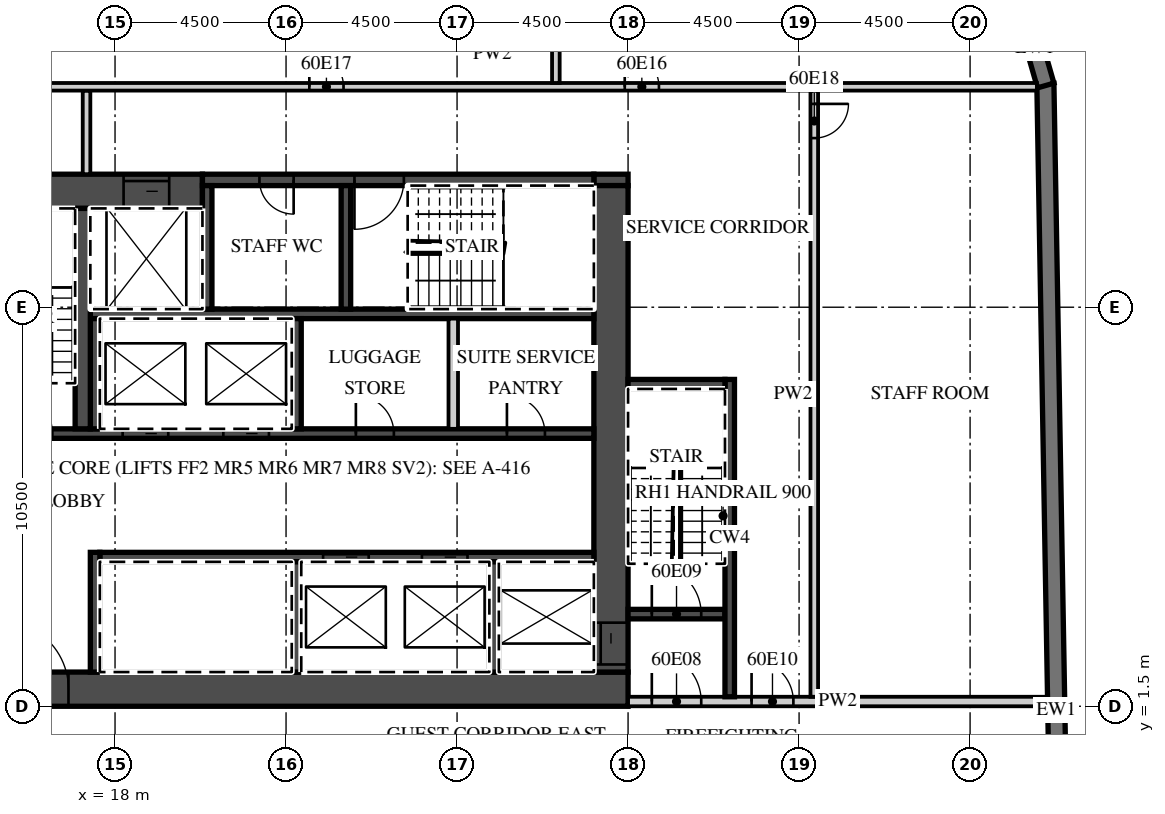
"""IFC4 building model, lengths in metres.
Left out: names, types, materials, properties, quantities, classifications, styles, units other than length and angle.
Written with IfcOpenShell. Run it as: python <this file> out.ifc"""

import sys

from ifc_helpers import new_model, si_unit, direction, frame, frame_2d, origin, place, context, subcontext, project, spatial, polyline, rectangle, outline, extrude, element, fill, save


model = new_model("IFC4")
c1 = context("Model", 3, precision=1e-05, world=origin(), true_north=direction((0.0, 1.0)))
c2 = subcontext(c1, "Body", "Model", "MODEL_VIEW")
j1 = project(units=[si_unit("LENGTHUNIT", "METRE"), si_unit("PLANEANGLEUNIT", "RADIAN")], contexts=[c1])
p1 = place(None, origin())
s1 = spatial("IfcSite", under=j1, at=p1, CompositionType="ELEMENT")
p2 = place(p1, origin())
s2 = spatial("IfcBuilding", under=s1, at=p2, CompositionType="ELEMENT")
p3 = place(p2, frame((0.0, 0.0, 244.1)))
s3 = spatial("IfcBuildingStorey", under=s2, at=p3, CompositionType="ELEMENT", Elevation=244.1)
p4 = place(p3, frame((43.057, -15.103, 0.0), z_axis=(0.0, 0.0, 1.0), x_axis=(-0.017452408953, 0.999847695112, 0.0)))
e1 = element("IfcWall", 1, at=p4, inside=s3, PredefinedType="SOLIDWALL", context=c2, shape_type="SweptSolid", body=[
    extrude(rectangle(XDim=33.0, YDim=0.45, at=frame_2d((16.5, 0.0))), origin(), (0.0, 0.0, 1.0), 3.02),
])
p5 = place(p3, frame((42.49, 17.833, 0.0), z_axis=(0.0, 0.0, 1.0), x_axis=(-0.275546368831, 0.961287781377, 0.0)))
e2 = element("IfcWall", 2, at=p5, inside=s3, PredefinedType="SOLIDWALL", context=c2, shape_type="SweptSolid", body=[
    extrude(outline(polyline([(0.0, -0.225), (2.071, -0.225), (1.95, 0.225), (0.121, 0.225), (0.0, -0.225)])), origin(), (0.0, 0.0, 1.0), 3.02),
])
p6 = place(p3, frame((13.5, 1.95, 0.0), z_axis=(0.0, 0.0, 1.0), x_axis=(1.0, 0.0, 0.0)))
e3 = element("IfcWall", 3, at=p6, inside=s3, PredefinedType="SHEAR", context=c2, shape_type="SweptSolid", body=[
    extrude(rectangle(XDim=18.0, YDim=0.9, at=frame_2d((9.0, 0.0))), origin(), (0.0, 0.0, 1.0), 3.02),
])
p7 = place(p6, frame((1.475, 0.0, 0.0)))
e4 = element("IfcOpeningElement", 4, at=p7, cuts=e3, PredefinedType="OPENING", context=c2, shape_type="SweptSolid", body=[
    extrude(rectangle(XDim=1.8, YDim=2.1, at=frame_2d((0.9, 1.05))), frame((0.0, 0.46, 0.0), z_axis=(0.0, -1.0, 0.0), x_axis=(1.0, 0.0, 0.0)), (0.0, 0.0, 1.0), 0.92),
])
p8 = place(p3, frame((13.5, 15.05, 0.0), z_axis=(0.0, 0.0, 1.0), x_axis=(1.0, 0.0, 0.0)))
e5 = element("IfcWall", 5, at=p8, inside=s3, PredefinedType="SHEAR", context=c2, shape_type="SweptSolid", body=[
    extrude(rectangle(XDim=6.8, YDim=0.9, at=frame_2d((3.4, 0.0))), origin(), (0.0, 0.0, 1.0), 3.02),
])
p9 = place(p8, frame((4.725, 0.0, 0.0)))
e6 = element("IfcOpeningElement", 6, at=p9, cuts=e5, PredefinedType="OPENING", context=c2, shape_type="SweptSolid", body=[
    extrude(rectangle(XDim=1.2, YDim=2.1, at=frame_2d((0.6, 1.05))), frame((0.0, 0.46, 0.0), z_axis=(0.0, -1.0, 0.0), x_axis=(1.0, 0.0, 0.0)), (0.0, 0.0, 1.0), 0.92),
])
p10 = place(p3, frame((30.6, 15.35, 0.0), z_axis=(0.0, 0.0, 1.0), x_axis=(1.0, 0.0, 0.0)))
e7 = element("IfcWall", 7, at=p10, inside=s3, PredefinedType="SHEAR", context=c2, shape_type="SweptSolid", body=[
    extrude(rectangle(XDim=0.9, YDim=0.3, at=frame_2d((0.45, 0.0))), origin(), (0.0, 0.0, 1.0), 3.02),
])
p11 = place(p3, frame((20.3, 15.35, 0.0), z_axis=(0.0, 0.0, 1.0), x_axis=(1.0, 0.0, 0.0)))
e8 = element("IfcWall", 8, at=p11, inside=s3, PredefinedType="SHEAR", context=c2, shape_type="SweptSolid", body=[
    extrude(rectangle(XDim=10.3, YDim=0.3, at=frame_2d((5.15, 0.0))), origin(), (0.0, 0.0, 1.0), 3.02),
])
p12 = place(p11, frame((4.0, 0.0, 0.0)))
e9 = element("IfcOpeningElement", 9, at=p12, cuts=e8, PredefinedType="OPENING", context=c2, shape_type="SweptSolid", body=[
    extrude(rectangle(XDim=1.3, YDim=2.1, at=frame_2d((0.65, 1.05))), frame((0.0, 0.16, 0.0), z_axis=(0.0, -1.0, 0.0), x_axis=(1.0, 0.0, 0.0)), (0.0, 0.0, 1.0), 0.32),
])
p13 = place(p11, frame((1.5, 0.0, 0.0)))
e10 = element("IfcOpeningElement", 10, at=p13, cuts=e8, PredefinedType="OPENING", context=c2, shape_type="SweptSolid", body=[
    extrude(rectangle(XDim=0.9, YDim=2.1, at=frame_2d((0.45, 1.05))), frame((0.0, 0.16, 0.0), z_axis=(0.0, -1.0, 0.0), x_axis=(1.0, 0.0, 0.0)), (0.0, 0.0, 1.0), 0.32),
])
p14 = place(p3, frame((31.05, 2.4, 0.0), z_axis=(0.0, 0.0, 1.0), x_axis=(0.0, 1.0, 0.0)))
e11 = element("IfcWall", 11, at=p14, inside=s3, PredefinedType="SHEAR", context=c2, shape_type="SweptSolid", body=[
    extrude(rectangle(XDim=12.8, YDim=0.9, at=frame_2d((6.4, 0.0))), origin(), (0.0, 0.0, 1.0), 3.02),
])
p15 = place(p14, frame((0.2, 0.0, 0.0)))
e12 = element("IfcOpeningElement", 12, at=p15, cuts=e11, PredefinedType="OPENING", context=c2, shape_type="SweptSolid", body=[
    extrude(rectangle(XDim=1.1, YDim=2.1, at=frame_2d((0.55, 1.05))), frame((0.0, 0.46, 0.0), z_axis=(0.0, -1.0, 0.0), x_axis=(1.0, 0.0, 0.0)), (0.0, 0.0, 1.0), 0.92),
])
p16 = place(p3, frame((17.6, 5.425, 0.0), z_axis=(0.0, 0.0, 1.0), x_axis=(1.0, 0.0, 0.0)))
e13 = element("IfcWall", 13, at=p16, inside=s3, PredefinedType="SHEAR", context=c2, shape_type="SweptSolid", body=[
    extrude(rectangle(XDim=13.0, YDim=0.25, at=frame_2d((6.5, 0.0))), origin(), (0.0, 0.0, 1.0), 3.02),
])
p17 = place(p16, frame((8.475, 0.0, 0.0)))
e14 = element("IfcOpeningElement", 14, at=p17, cuts=e13, PredefinedType="OPENING", context=c2, shape_type="SweptSolid", body=[
    extrude(rectangle(XDim=1.2, YDim=2.1, at=frame_2d((0.6, 1.05))), frame((0.0, 0.135, 0.0), z_axis=(0.0, -1.0, 0.0), x_axis=(1.0, 0.0, 0.0)), (0.0, 0.0, 1.0), 0.27),
])
p18 = place(p16, frame((5.875, 0.0, 0.0)))
e15 = element("IfcOpeningElement", 15, at=p18, cuts=e13, PredefinedType="OPENING", context=c2, shape_type="SweptSolid", body=[
    extrude(rectangle(XDim=1.2, YDim=2.1, at=frame_2d((0.6, 1.05))), frame((0.0, 0.135, 0.0), z_axis=(0.0, -1.0, 0.0), x_axis=(1.0, 0.0, 0.0)), (0.0, 0.0, 1.0), 0.27),
])
p19 = place(p3, frame((17.475, 2.4, 0.0), z_axis=(0.0, 0.0, 1.0), x_axis=(0.0, 1.0, 0.0)))
e16 = element("IfcWall", 16, at=p19, inside=s3, PredefinedType="SHEAR", context=c2, shape_type="SweptSolid", body=[
    extrude(rectangle(XDim=3.15, YDim=0.25, at=frame_2d((1.575, 0.0))), origin(), (0.0, 0.0, 1.0), 3.02),
])
for number, where, z_axis, x_axis in (
    (17, (27.975, 2.4, 0.0), (0.0, 0.0, 1.0), (0.0, 1.0, 0.0)),
    (18, (22.775, 2.4, 0.0), (0.0, 0.0, 1.0), (0.0, 1.0, 0.0)),
):
    element("IfcWall", number, at=place(p3, frame(where, z_axis=z_axis, x_axis=x_axis)), inside=s3, PredefinedType="SHEAR", context=c2, shape_type="SweptSolid", body=[
        extrude(rectangle(XDim=2.9, YDim=0.25, at=frame_2d((1.45, 0.0))), origin(), (0.0, 0.0, 1.0), 3.02),
    ])
p20 = place(p3, frame((14.4, 8.675, 0.0), z_axis=(0.0, 0.0, 1.0), x_axis=(1.0, 0.0, 0.0)))
e19 = element("IfcWall", 19, at=p20, inside=s3, PredefinedType="SHEAR", context=c2, shape_type="SweptSolid", body=[
    extrude(rectangle(XDim=16.2, YDim=0.25, at=frame_2d((8.1, 0.0))), origin(), (0.0, 0.0, 1.0), 3.02),
])
p21 = place(p20, frame((6.45, 0.0, 0.0)))
e20 = element("IfcOpeningElement", 20, at=p21, cuts=e19, PredefinedType="OPENING", context=c2, shape_type="SweptSolid", body=[
    extrude(rectangle(XDim=1.2, YDim=2.1, at=frame_2d((0.6, 1.05))), frame((0.0, 0.135, 0.0), z_axis=(0.0, -1.0, 0.0), x_axis=(1.0, 0.0, 0.0)), (0.0, 0.0, 1.0), 0.27),
])
p22 = place(p20, frame((3.8, 0.0, 0.0)))
e21 = element("IfcOpeningElement", 21, at=p22, cuts=e19, PredefinedType="OPENING", context=c2, shape_type="SweptSolid", body=[
    extrude(rectangle(XDim=1.2, YDim=2.1, at=frame_2d((0.6, 1.05))), frame((0.0, 0.135, 0.0), z_axis=(0.0, -1.0, 0.0), x_axis=(1.0, 0.0, 0.0)), (0.0, 0.0, 1.0), 0.27),
])
p23 = place(p20, frame((0.65, 0.0, 0.0)))
e22 = element("IfcOpeningElement", 22, at=p23, cuts=e19, PredefinedType="OPENING", context=c2, shape_type="SweptSolid", body=[
    extrude(rectangle(XDim=1.3, YDim=2.1, at=frame_2d((0.65, 1.05))), frame((0.0, 0.135, 0.0), z_axis=(0.0, -1.0, 0.0), x_axis=(1.0, 0.0, 0.0)), (0.0, 0.0, 1.0), 0.27),
])
p24 = place(p20, frame((13.913, 0.0, 0.0)))
e23 = element("IfcOpeningElement", 23, at=p24, cuts=e19, PredefinedType="OPENING", context=c2, shape_type="SweptSolid", body=[
    extrude(rectangle(XDim=1.0, YDim=2.1, at=frame_2d((0.5, 1.05))), frame((0.0, 0.135, 0.0), z_axis=(0.0, -1.0, 0.0), x_axis=(1.0, 0.0, 0.0)), (0.0, 0.0, 1.0), 0.27),
])
p25 = place(p20, frame((9.938, 0.0, 0.0)))
e24 = element("IfcOpeningElement", 24, at=p25, cuts=e19, PredefinedType="OPENING", context=c2, shape_type="SweptSolid", body=[
    extrude(rectangle(XDim=1.0, YDim=2.1, at=frame_2d((0.5, 1.05))), frame((0.0, 0.135, 0.0), z_axis=(0.0, -1.0, 0.0), x_axis=(1.0, 0.0, 0.0)), (0.0, 0.0, 1.0), 0.27),
])
p26 = place(p3, frame((17.35, 11.825, 0.0), z_axis=(0.0, 0.0, 1.0), x_axis=(1.0, 0.0, 0.0)))
e25 = element("IfcWall", 25, at=p26, inside=s3, PredefinedType="SHEAR", context=c2, shape_type="SweptSolid", body=[
    extrude(rectangle(XDim=13.25, YDim=0.25, at=frame_2d((6.625, 0.0))), origin(), (0.0, 0.0, 1.0), 3.02),
])
for number, where, z_axis, x_axis in (
    (26, (17.475, 8.8, 0.0), (0.0, 0.0, 1.0), (0.0, 1.0, 0.0)),
    (27, (22.775, 8.8, 0.0), (0.0, 0.0, 1.0), (0.0, 1.0, 0.0)),
):
    element("IfcWall", number, at=place(p3, frame(where, z_axis=z_axis, x_axis=x_axis)), inside=s3, PredefinedType="SHEAR", context=c2, shape_type="SweptSolid", body=[
        extrude(rectangle(XDim=2.9, YDim=0.25, at=frame_2d((1.45, 0.0))), origin(), (0.0, 0.0, 1.0), 3.02),
    ])
p27 = place(p3, frame((26.9, 8.8, 0.0), z_axis=(0.0, 0.0, 1.0), x_axis=(0.0, 1.0, 0.0)))
e28 = element("IfcWall", 28, at=p27, inside=s3, PredefinedType="PARTITIONING", context=c2, shape_type="SweptSolid", body=[
    extrude(rectangle(XDim=2.9, YDim=0.25, at=frame_2d((1.45, 0.0))), origin(), (0.0, 0.0, 1.0), 3.02),
])
p28 = place(p3, frame((17.15, 8.8, 0.0), z_axis=(0.0, 0.0, 1.0), x_axis=(0.0, 1.0, 0.0)))
e29 = element("IfcWall", 29, at=p28, inside=s3, PredefinedType="SHEAR", context=c2, shape_type="SweptSolid", body=[
    extrude(rectangle(XDim=5.8, YDim=0.4, at=frame_2d((2.9, 0.0))), origin(), (0.0, 0.0, 1.0), 3.02),
])
for number, where, z_axis, x_axis in (
    (30, (20.425, 11.95, 0.0), (0.0, 0.0, 1.0), (0.0, 1.0, 0.0)),
    (31, (24.075, 11.95, 0.0), (0.0, 0.0, 1.0), (0.0, 1.0, 0.0)),
):
    element("IfcWall", number, at=place(p3, frame(where, z_axis=z_axis, x_axis=x_axis)), inside=s3, PredefinedType="SHEAR", context=c2, shape_type="SweptSolid", body=[
        extrude(rectangle(XDim=3.25, YDim=0.25, at=frame_2d((1.625, 0.0))), origin(), (0.0, 0.0, 1.0), 3.02),
    ])
p29 = place(p3, frame((31.5, 1.625, 0.0), z_axis=(0.0, 0.0, 1.0), x_axis=(1.0, 0.0, 0.0)))
e32 = element("IfcWall", 32, at=p29, inside=s3, PredefinedType="PARTITIONING", context=c2, shape_type="SweptSolid", body=[
    extrude(rectangle(XDim=11.04, YDim=0.25, at=frame_2d((5.52, 0.0))), origin(), (0.0, 0.0, 1.0), 3.02),
])
p30 = place(p29, frame((0.625, 0.0, 0.0)))
e33 = element("IfcOpeningElement", 33, at=p30, cuts=e32, PredefinedType="OPENING", context=c2, shape_type="SweptSolid", body=[
    extrude(rectangle(XDim=1.3, YDim=2.1, at=frame_2d((0.65, 1.05))), frame((0.0, 0.135, 0.0), z_axis=(0.0, -1.0, 0.0), x_axis=(1.0, 0.0, 0.0)), (0.0, 0.0, 1.0), 0.27),
])
p31 = place(p29, frame((3.25, 0.0, 0.0)))
e34 = element("IfcOpeningElement", 34, at=p31, cuts=e32, PredefinedType="OPENING", context=c2, shape_type="SweptSolid", body=[
    extrude(rectangle(XDim=1.1, YDim=2.1, at=frame_2d((0.55, 1.05))), frame((0.0, 0.135, 0.0), z_axis=(0.0, -1.0, 0.0), x_axis=(1.0, 0.0, 0.0)), (0.0, 0.0, 1.0), 0.27),
])
p32 = place(p3, frame((31.5, 3.925, 0.0), z_axis=(0.0, 0.0, 1.0), x_axis=(1.0, 0.0, 0.0)))
e35 = element("IfcWall", 35, at=p32, inside=s3, PredefinedType="SHEAR", context=c2, shape_type="SweptSolid", body=[
    extrude(rectangle(XDim=2.55, YDim=0.25, at=frame_2d((1.275, 0.0))), origin(), (0.0, 0.0, 1.0), 3.02),
])
p33 = place(p32, frame((0.625, 0.0, 0.0)))
e36 = element("IfcOpeningElement", 36, at=p33, cuts=e35, PredefinedType="OPENING", context=c2, shape_type="SweptSolid", body=[
    extrude(rectangle(XDim=1.3, YDim=2.1, at=frame_2d((0.65, 1.05))), frame((0.0, 0.135, 0.0), z_axis=(0.0, -1.0, 0.0), x_axis=(1.0, 0.0, 0.0)), (0.0, 0.0, 1.0), 0.27),
])
p34 = place(p3, frame((34.175, 1.75, 0.0), z_axis=(0.0, 0.0, 1.0), x_axis=(0.0, 1.0, 0.0)))
e37 = element("IfcWall", 37, at=p34, inside=s3, PredefinedType="SHEAR", context=c2, shape_type="SweptSolid", body=[
    extrude(rectangle(XDim=8.35, YDim=0.25, at=frame_2d((4.175, 0.0))), origin(), (0.0, 0.0, 1.0), 3.02),
])
p35 = place(p3, frame((31.5, 9.975, 0.0), z_axis=(0.0, 0.0, 1.0), x_axis=(1.0, 0.0, 0.0)))
e38 = element("IfcWall", 38, at=p35, inside=s3, PredefinedType="SHEAR", context=c2, shape_type="SweptSolid", body=[
    extrude(rectangle(XDim=2.55, YDim=0.25, at=frame_2d((1.275, 0.0))), origin(), (0.0, 0.0, 1.0), 3.02),
])
p36 = place(p3, frame((17.25, 15.5, 0.0), z_axis=(0.0, 0.0, 1.0), x_axis=(0.0, 1.0, 0.0)))
e39 = element("IfcWall", 39, at=p36, inside=s3, PredefinedType="PARTITIONING", context=c2, shape_type="SweptSolid", body=[
    extrude(rectangle(XDim=2.2, YDim=0.2, at=frame_2d((1.1, 0.0))), origin(), (0.0, 0.0, 1.0), 3.02),
])
p37 = place(p3, frame((36.4, 1.75, 0.0), z_axis=(0.0, 0.0, 1.0), x_axis=(0.0, 1.0, 0.0)))
e40 = element("IfcWall", 40, at=p37, inside=s3, PredefinedType="PARTITIONING", context=c2, shape_type="SweptSolid", body=[
    extrude(rectangle(XDim=15.95, YDim=0.2, at=frame_2d((7.975, 0.0))), origin(), (0.0, 0.0, 1.0), 3.02),
])
p38 = place(p37, frame((14.7, 0.0, 0.0)))
e41 = element("IfcOpeningElement", 41, at=p38, cuts=e40, PredefinedType="OPENING", context=c2, shape_type="SweptSolid", body=[
    extrude(rectangle(XDim=0.9, YDim=2.1, at=frame_2d((0.45, 1.05))), frame((0.0, 0.11, 0.0), z_axis=(0.0, -1.0, 0.0), x_axis=(1.0, 0.0, 0.0)), (0.0, 0.0, 1.0), 0.22),
])
p39 = place(p3, frame((13.6, 17.8, 0.0), z_axis=(0.0, 0.0, 1.0), x_axis=(1.0, 0.0, 0.0)))
e42 = element("IfcWall", 42, at=p39, inside=s3, PredefinedType="PARTITIONING", context=c2, shape_type="SweptSolid", body=[
    extrude(rectangle(XDim=28.657, YDim=0.2, at=frame_2d((14.329, 0.0))), origin(), (0.0, 0.0, 1.0), 3.02),
])
p40 = place(p39, frame((17.812, 0.0, 0.0)))
e43 = element("IfcOpeningElement", 43, at=p40, cuts=e42, PredefinedType="OPENING", context=c2, shape_type="SweptSolid", body=[
    extrude(rectangle(XDim=0.9, YDim=2.1, at=frame_2d((0.45, 1.05))), frame((0.0, 0.11, 0.0), z_axis=(0.0, -1.0, 0.0), x_axis=(1.0, 0.0, 0.0)), (0.0, 0.0, 1.0), 0.22),
])
p41 = place(p39, frame((9.512, 0.0, 0.0)))
e44 = element("IfcOpeningElement", 44, at=p41, cuts=e42, PredefinedType="OPENING", context=c2, shape_type="SweptSolid", body=[
    extrude(rectangle(XDim=0.9, YDim=2.1, at=frame_2d((0.45, 1.05))), frame((0.0, 0.11, 0.0), z_axis=(0.0, -1.0, 0.0), x_axis=(1.0, 0.0, 0.0)), (0.0, 0.0, 1.0), 0.22),
])
p42 = place(p3, frame((29.6, 17.9, 0.0), z_axis=(0.0, 0.0, 1.0), x_axis=(0.0, 1.0, 0.0)))
e45 = element("IfcWall", 45, at=p42, inside=s3, PredefinedType="PARTITIONING", context=c2, shape_type="SweptSolid", body=[
    extrude(rectangle(XDim=3.318, YDim=0.2, at=frame_2d((1.659, 0.0))), origin(), (0.0, 0.0, 1.0), 3.02),
])
p43 = place(p21, origin())
e46 = element("IfcDoor", 46, at=p43, inside=s3, OperationType="SLIDING_TO_LEFT", PredefinedType="DOOR", context=c2, shape_type="SweptSolid", body=[
    extrude(rectangle(XDim=1.2, YDim=2.1, at=frame_2d((0.6, 1.05))), frame((0.0, 0.025, 0.0), z_axis=(0.0, -1.0, 0.0), x_axis=(1.0, 0.0, 0.0)), (0.0, 0.0, 1.0), 0.05),
])
fill(e20, e46)
p44 = place(p22, origin())
e47 = element("IfcDoor", 47, at=p44, inside=s3, OperationType="SLIDING_TO_RIGHT", PredefinedType="DOOR", context=c2, shape_type="SweptSolid", body=[
    extrude(rectangle(XDim=1.2, YDim=2.1, at=frame_2d((0.6, 1.05))), frame((0.0, 0.025, 0.0), z_axis=(0.0, -1.0, 0.0), x_axis=(1.0, 0.0, 0.0)), (0.0, 0.0, 1.0), 0.05),
])
fill(e21, e47)
p45 = place(p17, origin())
e48 = element("IfcDoor", 48, at=p45, inside=s3, OperationType="SLIDING_TO_LEFT", PredefinedType="DOOR", context=c2, shape_type="SweptSolid", body=[
    extrude(rectangle(XDim=1.2, YDim=2.1, at=frame_2d((0.6, 1.05))), frame((0.0, 0.025, 0.0), z_axis=(0.0, -1.0, 0.0), x_axis=(1.0, 0.0, 0.0)), (0.0, 0.0, 1.0), 0.05),
])
fill(e14, e48)
p46 = place(p18, origin())
e49 = element("IfcDoor", 49, at=p46, inside=s3, OperationType="SLIDING_TO_RIGHT", PredefinedType="DOOR", context=c2, shape_type="SweptSolid", body=[
    extrude(rectangle(XDim=1.2, YDim=2.1, at=frame_2d((0.6, 1.05))), frame((0.0, 0.025, 0.0), z_axis=(0.0, -1.0, 0.0), x_axis=(1.0, 0.0, 0.0)), (0.0, 0.0, 1.0), 0.05),
])
fill(e15, e49)
p47 = place(p9, origin())
e50 = element("IfcDoor", 50, at=p47, inside=s3, OperationType="SLIDING_TO_LEFT", PredefinedType="DOOR", context=c2, shape_type="SweptSolid", body=[
    extrude(rectangle(XDim=1.2, YDim=2.1, at=frame_2d((0.6, 1.05))), frame((0.0, 0.025, 0.0), z_axis=(0.0, -1.0, 0.0), x_axis=(1.0, 0.0, 0.0)), (0.0, 0.0, 1.0), 0.05),
])
fill(e6, e50)
p48 = place(p15, origin())
e51 = element("IfcDoor", 51, at=p48, inside=s3, OperationType="SLIDING_TO_LEFT", PredefinedType="DOOR", context=c2, shape_type="SweptSolid", body=[
    extrude(rectangle(XDim=1.1, YDim=2.1, at=frame_2d((0.55, 1.05))), frame((0.0, 0.025, 0.0), z_axis=(0.0, -1.0, 0.0), x_axis=(1.0, 0.0, 0.0)), (0.0, 0.0, 1.0), 0.05),
])
fill(e12, e51)
p49 = place(p7, origin())
e52 = element("IfcDoor", 52, at=p49, inside=s3, OperationType="DOUBLE_DOOR_DOUBLE_SWING", PredefinedType="DOOR", context=c2, shape_type="SweptSolid", body=[
    extrude(rectangle(XDim=1.8, YDim=2.1, at=frame_2d((0.9, 1.05))), frame((0.0, 0.025, 0.0), z_axis=(0.0, -1.0, 0.0), x_axis=(1.0, 0.0, 0.0)), (0.0, 0.0, 1.0), 0.05),
])
fill(e4, e52)
p50 = place(p30, origin())
e53 = element("IfcDoor", 53, at=p50, inside=s3, OperationType="SINGLE_SWING_LEFT", PredefinedType="DOOR", context=c2, shape_type="SweptSolid", body=[
    extrude(rectangle(XDim=1.3, YDim=2.1, at=frame_2d((0.65, 1.05))), frame((0.0, 0.025, 0.0), z_axis=(0.0, -1.0, 0.0), x_axis=(1.0, 0.0, 0.0)), (0.0, 0.0, 1.0), 0.05),
])
fill(e33, e53)
p51 = place(p33, origin())
e54 = element("IfcDoor", 54, at=p51, inside=s3, OperationType="SINGLE_SWING_LEFT", PredefinedType="DOOR", context=c2, shape_type="SweptSolid", body=[
    extrude(rectangle(XDim=1.3, YDim=2.1, at=frame_2d((0.65, 1.05))), frame((0.0, 0.025, 0.0), z_axis=(0.0, -1.0, 0.0), x_axis=(1.0, 0.0, 0.0)), (0.0, 0.0, 1.0), 0.05),
])
fill(e36, e54)
p52 = place(p31, origin())
e55 = element("IfcDoor", 55, at=p52, inside=s3, OperationType="SINGLE_SWING_LEFT", PredefinedType="DOOR", context=c2, shape_type="SweptSolid", body=[
    extrude(rectangle(XDim=1.1, YDim=2.1, at=frame_2d((0.55, 1.05))), frame((0.0, 0.025, 0.0), z_axis=(0.0, -1.0, 0.0), x_axis=(1.0, 0.0, 0.0)), (0.0, 0.0, 1.0), 0.05),
])
fill(e34, e55)
p53 = place(p12, origin())
e56 = element("IfcDoor", 56, at=p53, inside=s3, OperationType="SINGLE_SWING_LEFT", PredefinedType="DOOR", context=c2, shape_type="SweptSolid", body=[
    extrude(rectangle(XDim=1.3, YDim=2.1, at=frame_2d((0.65, 1.05))), frame((0.0, 0.025, 0.0), z_axis=(0.0, -1.0, 0.0), x_axis=(1.0, 0.0, 0.0)), (0.0, 0.0, 1.0), 0.05),
])
fill(e9, e56)
p54 = place(p13, origin())
e57 = element("IfcDoor", 57, at=p54, inside=s3, OperationType="SINGLE_SWING_RIGHT", PredefinedType="DOOR", context=c2, shape_type="SweptSolid", body=[
    extrude(rectangle(XDim=0.9, YDim=2.1, at=frame_2d((0.45, 1.05))), frame((0.0, 0.025, 0.0), z_axis=(0.0, -1.0, 0.0), x_axis=(1.0, 0.0, 0.0)), (0.0, 0.0, 1.0), 0.05),
])
fill(e10, e57)
p55 = place(p24, origin())
e58 = element("IfcDoor", 58, at=p55, inside=s3, OperationType="SINGLE_SWING_LEFT", PredefinedType="DOOR", context=c2, shape_type="SweptSolid", body=[
    extrude(rectangle(XDim=1.0, YDim=2.1, at=frame_2d((0.5, 1.05))), frame((0.0, 0.025, 0.0), z_axis=(0.0, -1.0, 0.0), x_axis=(1.0, 0.0, 0.0)), (0.0, 0.0, 1.0), 0.05),
])
fill(e23, e58)
p56 = place(p25, origin())
e59 = element("IfcDoor", 59, at=p56, inside=s3, OperationType="SINGLE_SWING_LEFT", PredefinedType="DOOR", context=c2, shape_type="SweptSolid", body=[
    extrude(rectangle(XDim=1.0, YDim=2.1, at=frame_2d((0.5, 1.05))), frame((0.0, 0.025, 0.0), z_axis=(0.0, -1.0, 0.0), x_axis=(1.0, 0.0, 0.0)), (0.0, 0.0, 1.0), 0.05),
])
fill(e24, e59)
p57 = place(p40, origin())
e60 = element("IfcDoor", 60, at=p57, inside=s3, OperationType="SINGLE_SWING_LEFT", PredefinedType="DOOR", context=c2, shape_type="SweptSolid", body=[
    extrude(rectangle(XDim=0.9, YDim=2.1, at=frame_2d((0.45, 1.05))), frame((0.0, 0.025, 0.0), z_axis=(0.0, -1.0, 0.0), x_axis=(1.0, 0.0, 0.0)), (0.0, 0.0, 1.0), 0.05),
])
fill(e43, e60)
p58 = place(p41, origin())
e61 = element("IfcDoor", 61, at=p58, inside=s3, OperationType="SINGLE_SWING_LEFT", PredefinedType="DOOR", context=c2, shape_type="SweptSolid", body=[
    extrude(rectangle(XDim=0.9, YDim=2.1, at=frame_2d((0.45, 1.05))), frame((0.0, 0.025, 0.0), z_axis=(0.0, -1.0, 0.0), x_axis=(1.0, 0.0, 0.0)), (0.0, 0.0, 1.0), 0.05),
])
fill(e44, e61)
p59 = place(p38, origin())
e62 = element("IfcDoor", 62, at=p59, inside=s3, OperationType="SINGLE_SWING_RIGHT", PredefinedType="DOOR", context=c2, shape_type="SweptSolid", body=[
    extrude(rectangle(XDim=0.9, YDim=2.1, at=frame_2d((0.45, 1.05))), frame((0.0, 0.025, 0.0), z_axis=(0.0, -1.0, 0.0), x_axis=(1.0, 0.0, 0.0)), (0.0, 0.0, 1.0), 0.05),
])
fill(e41, e62)
save(model, sys.argv[1])
